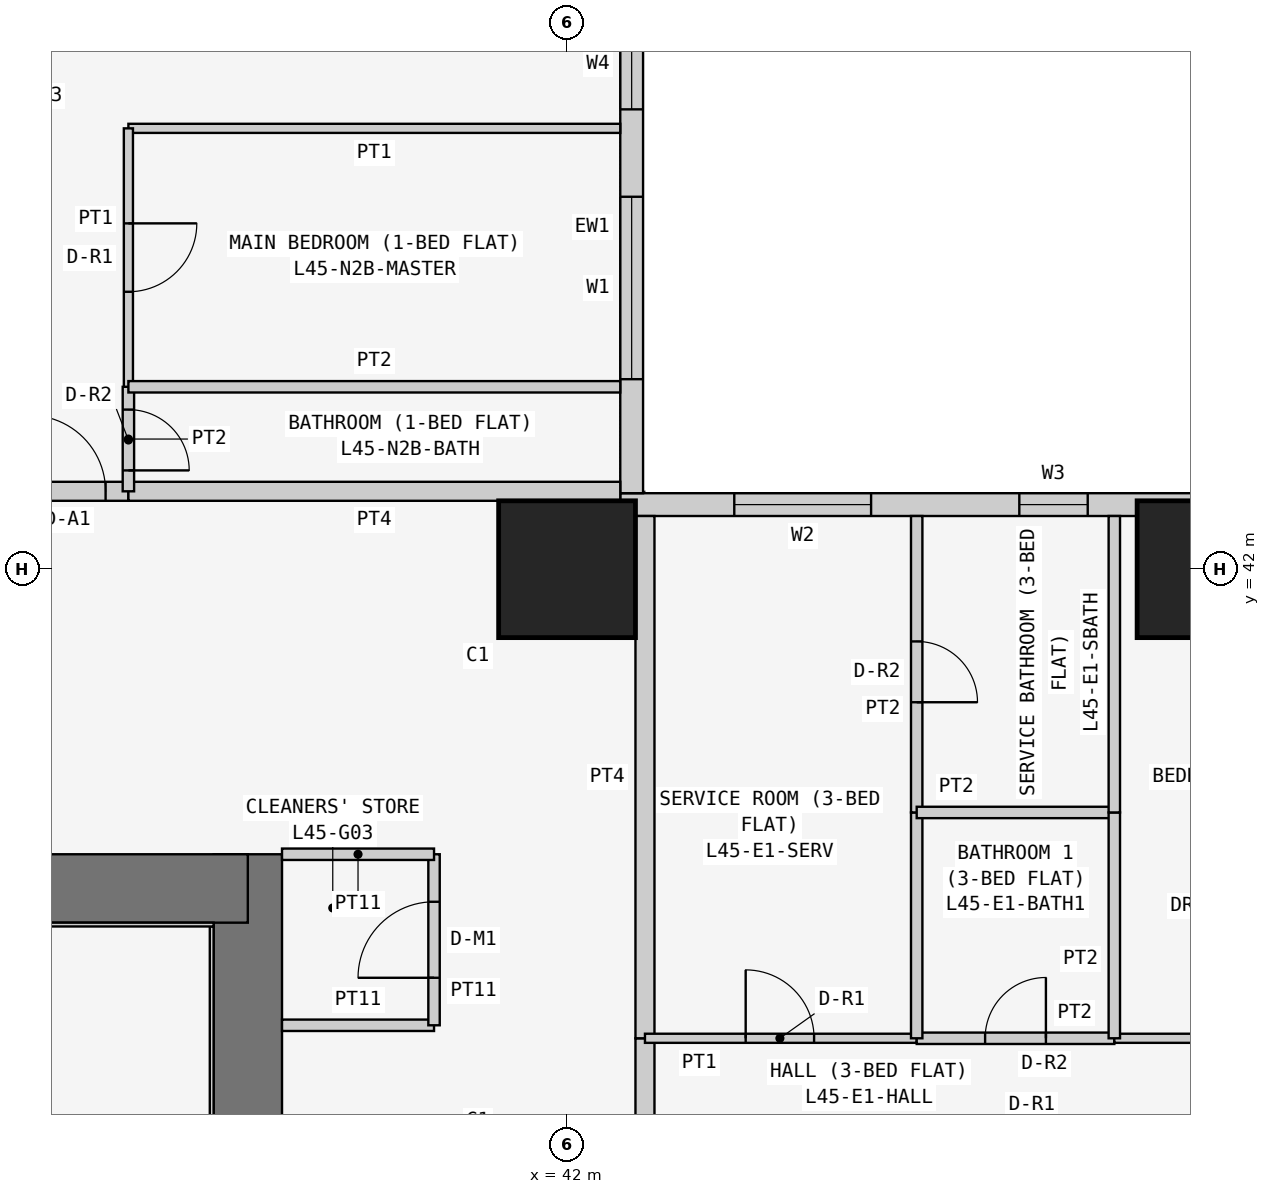
"""IFC4 building model, lengths in metres.
Left out: names, types, materials, properties, quantities, classifications, styles, units other than length and angle.
Written with IfcOpenShell. Run it as: python <this file> out.ifc"""

import sys

from ifc_helpers import new_model, si_unit, direction, frame, frame_2d, origin, origin_2d, place, context, subcontext, project, spatial, rectangle, extrude, element, fill, save


model = new_model("IFC4")
c1 = context("Model", 3, precision=1e-05, world=origin(), true_north=direction((0.0, 1.0)))
c2 = subcontext(c1, "Body", "Model", "MODEL_VIEW")
j1 = project(units=[si_unit("LENGTHUNIT", "METRE"), si_unit("PLANEANGLEUNIT", "RADIAN")], contexts=[c1])
p1 = place(None, origin())
s1 = spatial("IfcSite", under=j1, at=p1, CompositionType="ELEMENT")
p2 = place(p1, origin())
s2 = spatial("IfcBuilding", under=s1, at=p2, CompositionType="ELEMENT")
p3 = place(p2, frame((0.0, 0.0, 173.7)))
s3 = spatial("IfcBuildingStorey", under=s2, at=p3, CompositionType="ELEMENT", Elevation=173.7)
for number, where, z_axis, x_axis in (
    (1, (42.0, 42.0, 0.0), (0.0, 0.0, 1.0), (1.0, 0.0, 0.0)),
    (2, (50.4, 42.0, 0.0), (0.0, 0.0, 1.0), (1.0, 0.0, 0.0)),
):
    element("IfcColumn", number, at=place(p3, frame(where, z_axis=z_axis, x_axis=x_axis)), inside=s3, PredefinedType="COLUMN", context=c2, shape_type="SweptSolid", body=[
        extrude(rectangle(XDim=1.8, YDim=1.8, at=origin_2d()), origin(), (0.0, 0.0, 1.0), 3.6),
    ])
p4 = place(p3, frame((37.8, 21.0, 0.0), z_axis=(0.0, 0.0, 1.0), x_axis=(0.0, 1.0, 0.0)))
e3 = element("IfcWall", 3, at=p4, inside=s3, PredefinedType="SHEAR", context=c2, shape_type="SweptSolid", body=[
    extrude(rectangle(XDim=17.25, YDim=0.9, at=frame_2d((8.625, 0.0))), origin(), (0.0, 0.0, 1.0), 3.6),
])
p5 = place(p4, frame((5.2, 0.0, 0.0)))
e4 = element("IfcOpeningElement", 4, at=p5, cuts=e3, PredefinedType="OPENING", context=c2, shape_type="SweptSolid", body=[
    extrude(rectangle(XDim=1.2, YDim=2.1, at=frame_2d((0.6, 1.05))), frame((0.0, 0.46, 0.0), z_axis=(0.0, -1.0, 0.0), x_axis=(1.0, 0.0, 0.0)), (0.0, 0.0, 1.0), 0.92),
])
p6 = place(p3, frame((37.8, 37.8, 0.0), z_axis=(0.0, 0.0, 1.0), x_axis=(-1.0, 0.0, 0.0)))
e5 = element("IfcWall", 5, at=p6, inside=s3, PredefinedType="SHEAR", context=c2, shape_type="SweptSolid", body=[
    extrude(rectangle(XDim=17.25, YDim=0.9, at=frame_2d((8.625, 0.0))), origin(), (0.0, 0.0, 1.0), 3.6),
])
p7 = place(p3, frame((58.4, 42.85, 0.0), z_axis=(0.0, 0.0, 1.0), x_axis=(-1.0, 0.0, 0.0)))
e6 = element("IfcWall", 6, at=p7, inside=s3, PredefinedType="SOLIDWALL", context=c2, shape_type="SweptSolid", body=[
    extrude(rectangle(XDim=15.7, YDim=0.3, at=frame_2d((7.85, 0.0))), origin(), (0.0, 0.0, 1.0), 3.35),
])
p8 = place(p7, frame((12.4, 0.0, 0.9)))
e7 = element("IfcOpeningElement", 7, at=p8, cuts=e6, PredefinedType="OPENING", context=c2, shape_type="SweptSolid", body=[
    extrude(rectangle(XDim=1.8, YDim=1.5, at=frame_2d((0.9, 0.75))), frame((0.0, 0.16, 0.0), z_axis=(0.0, -1.0, 0.0), x_axis=(1.0, 0.0, 0.0)), (0.0, 0.0, 1.0), 0.32),
])
p9 = place(p7, frame((9.55, 0.0, 1.5)))
e8 = element("IfcOpeningElement", 8, at=p9, cuts=e6, PredefinedType="OPENING", context=c2, shape_type="SweptSolid", body=[
    extrude(rectangle(XDim=0.9, YDim=0.7, at=frame_2d((0.45, 0.35))), frame((0.0, 0.16, 0.0), z_axis=(0.0, -1.0, 0.0), x_axis=(1.0, 0.0, 0.0)), (0.0, 0.0, 1.0), 0.32),
])
p10 = place(p7, frame((5.1, 0.0, 0.9)))
e9 = element("IfcOpeningElement", 9, at=p10, cuts=e6, PredefinedType="OPENING", context=c2, shape_type="SweptSolid", body=[
    extrude(rectangle(XDim=1.8, YDim=1.5, at=frame_2d((0.9, 0.75))), frame((0.0, 0.16, 0.0), z_axis=(0.0, -1.0, 0.0), x_axis=(1.0, 0.0, 0.0)), (0.0, 0.0, 1.0), 0.32),
])
p11 = place(p7, frame((2.0, 0.0, 0.0)))
e10 = element("IfcOpeningElement", 10, at=p11, cuts=e6, PredefinedType="OPENING", context=c2, shape_type="SweptSolid", body=[
    extrude(rectangle(XDim=0.9, YDim=2.4, at=frame_2d((0.45, 1.2))), frame((0.0, 0.16, 0.0), z_axis=(0.0, -1.0, 0.0), x_axis=(1.0, 0.0, 0.0)), (0.0, 0.0, 1.0), 0.32),
])
p12 = place(p7, frame((0.7, 0.0, 0.9)))
e11 = element("IfcOpeningElement", 11, at=p12, cuts=e6, PredefinedType="OPENING", context=c2, shape_type="SweptSolid", body=[
    extrude(rectangle(XDim=1.2, YDim=1.5, at=frame_2d((0.6, 0.75))), frame((0.0, 0.16, 0.0), z_axis=(0.0, -1.0, 0.0), x_axis=(1.0, 0.0, 0.0)), (0.0, 0.0, 1.0), 0.32),
])
p13 = place(p3, frame((42.85, 43.0, 0.0), z_axis=(0.0, 0.0, 1.0), x_axis=(0.0, 1.0, 0.0)))
e12 = element("IfcWall", 12, at=p13, inside=s3, PredefinedType="SOLIDWALL", context=c2, shape_type="SweptSolid", body=[
    extrude(rectangle(XDim=7.0, YDim=0.3, at=frame_2d((3.5, 0.0))), origin(), (0.0, 0.0, 1.0), 3.35),
])
p14 = place(p13, frame((1.5, 0.0, 0.9)))
e13 = element("IfcOpeningElement", 13, at=p14, cuts=e12, PredefinedType="OPENING", context=c2, shape_type="SweptSolid", body=[
    extrude(rectangle(XDim=2.4, YDim=1.5, at=frame_2d((1.2, 0.75))), frame((0.0, 0.16, 0.0), z_axis=(0.0, -1.0, 0.0), x_axis=(1.0, 0.0, 0.0)), (0.0, 0.0, 1.0), 0.32),
])
p15 = place(p13, frame((5.05, 0.0, 0.9)))
e14 = element("IfcOpeningElement", 14, at=p15, cuts=e12, PredefinedType="OPENING", context=c2, shape_type="SweptSolid", body=[
    extrude(rectangle(XDim=1.2, YDim=1.5, at=frame_2d((0.6, 0.75))), frame((0.0, 0.16, 0.0), z_axis=(0.0, -1.0, 0.0), x_axis=(1.0, 0.0, 0.0)), (0.0, 0.0, 1.0), 0.32),
])
p16 = place(p3, frame((38.25, 36.0, 0.0), z_axis=(0.0, 0.0, 1.0), x_axis=(1.0, 0.0, 0.0)))
e15 = element("IfcWall", 15, at=p16, inside=s3, PredefinedType="PARTITIONING", context=c2, shape_type="SweptSolid", body=[
    extrude(rectangle(XDim=2.0, YDim=0.15, at=frame_2d((1.0, 0.0))), origin(), (0.0, 0.0, 1.0), 3.35),
])
p17 = place(p3, frame((40.25, 36.0, 0.0), z_axis=(0.0, 0.0, 1.0), x_axis=(0.0, 1.0, 0.0)))
e16 = element("IfcWall", 16, at=p17, inside=s3, PredefinedType="PARTITIONING", context=c2, shape_type="SweptSolid", body=[
    extrude(rectangle(XDim=2.25, YDim=0.15, at=frame_2d((1.125, 0.0))), origin(), (0.0, 0.0, 1.0), 3.35),
])
p18 = place(p17, frame((0.625, 0.0, 0.0)))
e17 = element("IfcOpeningElement", 17, at=p18, cuts=e16, PredefinedType="OPENING", context=c2, shape_type="SweptSolid", body=[
    extrude(rectangle(XDim=1.0, YDim=2.1, at=frame_2d((0.5, 1.05))), frame((0.0, 0.085, 0.0), z_axis=(0.0, -1.0, 0.0), x_axis=(1.0, 0.0, 0.0)), (0.0, 0.0, 1.0), 0.17),
])
p19 = place(p3, frame((40.25, 38.25, 0.0), z_axis=(0.0, 0.0, 1.0), x_axis=(-1.0, 0.0, 0.0)))
e18 = element("IfcWall", 18, at=p19, inside=s3, PredefinedType="PARTITIONING", context=c2, shape_type="SweptSolid", body=[
    extrude(rectangle(XDim=2.0, YDim=0.15, at=frame_2d((1.0, 0.0))), origin(), (0.0, 0.0, 1.0), 3.35),
])
p20 = place(p3, frame((34.629, 43.025, 0.0), z_axis=(0.0, 0.0, 1.0), x_axis=(1.0, 0.0, 0.0)))
e19 = element("IfcWall", 19, at=p20, inside=s3, PredefinedType="PARTITIONING", context=c2, shape_type="SweptSolid", body=[
    extrude(rectangle(XDim=1.6, YDim=0.25, at=frame_2d((0.8, 0.0))), origin(), (0.0, 0.0, 1.0), 3.35),
])
p21 = place(p20, frame((0.3, 0.0, 0.0)))
e20 = element("IfcOpeningElement", 20, at=p21, cuts=e19, PredefinedType="OPENING", context=c2, shape_type="SweptSolid", body=[
    extrude(rectangle(XDim=1.0, YDim=2.1, at=frame_2d((0.5, 1.05))), frame((0.0, 0.135, 0.0), z_axis=(0.0, -1.0, 0.0), x_axis=(1.0, 0.0, 0.0)), (0.0, 0.0, 1.0), 0.27),
])
p22 = place(p3, frame((36.229, 43.025, 0.0), z_axis=(0.0, 0.0, 1.0), x_axis=(1.0, 0.0, 0.0)))
e21 = element("IfcWall", 21, at=p22, inside=s3, PredefinedType="PARTITIONING", context=c2, shape_type="SweptSolid", body=[
    extrude(rectangle(XDim=6.471, YDim=0.25, at=frame_2d((3.235, 0.0))), origin(), (0.0, 0.0, 1.0), 3.35),
])
p23 = place(p3, frame((43.025, 35.829, 0.0), z_axis=(0.0, 0.0, 1.0), x_axis=(0.0, -1.0, 0.0)))
e22 = element("IfcWall", 22, at=p23, inside=s3, PredefinedType="PARTITIONING", context=c2, shape_type="SweptSolid", body=[
    extrude(rectangle(XDim=1.2, YDim=0.25, at=frame_2d((0.6, 0.0))), origin(), (0.0, 0.0, 1.0), 3.35),
])
p24 = place(p3, frame((43.025, 42.7, 0.0), z_axis=(0.0, 0.0, 1.0), x_axis=(0.0, -1.0, 0.0)))
e23 = element("IfcWall", 23, at=p24, inside=s3, PredefinedType="PARTITIONING", context=c2, shape_type="SweptSolid", body=[
    extrude(rectangle(XDim=6.871, YDim=0.25, at=frame_2d((3.436, 0.0))), origin(), (0.0, 0.0, 1.0), 3.35),
])
p25 = place(p3, frame((36.229, 44.4, 0.0), z_axis=(0.0, 0.0, 1.0), x_axis=(0.0, -1.0, 0.0)))
e24 = element("IfcWall", 24, at=p25, inside=s3, PredefinedType="PARTITIONING", context=c2, shape_type="SweptSolid", body=[
    extrude(rectangle(XDim=1.375, YDim=0.15, at=frame_2d((0.688, 0.0))), origin(), (0.0, 0.0, 1.0), 3.35),
])
p26 = place(p25, frame((0.3, 0.0, 0.0)))
e25 = element("IfcOpeningElement", 25, at=p26, cuts=e24, PredefinedType="OPENING", context=c2, shape_type="SweptSolid", body=[
    extrude(rectangle(XDim=0.8, YDim=2.1, at=frame_2d((0.4, 1.05))), frame((0.0, 0.085, 0.0), z_axis=(0.0, -1.0, 0.0), x_axis=(1.0, 0.0, 0.0)), (0.0, 0.0, 1.0), 0.17),
])
p27 = place(p3, frame((42.7, 47.8, 0.0), z_axis=(0.0, 0.0, 1.0), x_axis=(-1.0, 0.0, 0.0)))
e26 = element("IfcWall", 26, at=p27, inside=s3, PredefinedType="PARTITIONING", context=c2, shape_type="SweptSolid", body=[
    extrude(rectangle(XDim=6.471, YDim=0.12, at=frame_2d((3.235, 0.0))), origin(), (0.0, 0.0, 1.0), 3.35),
])
p28 = place(p3, frame((36.229, 47.8, 0.0), z_axis=(0.0, 0.0, 1.0), x_axis=(0.0, -1.0, 0.0)))
e27 = element("IfcWall", 27, at=p28, inside=s3, PredefinedType="PARTITIONING", context=c2, shape_type="SweptSolid", body=[
    extrude(rectangle(XDim=3.4, YDim=0.12, at=frame_2d((1.7, 0.0))), origin(), (0.0, 0.0, 1.0), 3.35),
])
p29 = place(p28, frame((1.25, 0.0, 0.0)))
e28 = element("IfcOpeningElement", 28, at=p29, cuts=e27, PredefinedType="OPENING", context=c2, shape_type="SweptSolid", body=[
    extrude(rectangle(XDim=0.9, YDim=2.1, at=frame_2d((0.45, 1.05))), frame((0.0, 0.07, 0.0), z_axis=(0.0, -1.0, 0.0), x_axis=(1.0, 0.0, 0.0)), (0.0, 0.0, 1.0), 0.14),
])
p30 = place(p3, frame((36.229, 44.4, 0.0), z_axis=(0.0, 0.0, 1.0), x_axis=(1.0, 0.0, 0.0)))
e29 = element("IfcWall", 29, at=p30, inside=s3, PredefinedType="PARTITIONING", context=c2, shape_type="SweptSolid", body=[
    extrude(rectangle(XDim=6.471, YDim=0.15, at=frame_2d((3.235, 0.0))), origin(), (0.0, 0.0, 1.0), 3.35),
])
p31 = place(p3, frame((46.6, 35.829, 0.0), z_axis=(0.0, 0.0, 1.0), x_axis=(-1.0, 0.0, 0.0)))
e30 = element("IfcWall", 30, at=p31, inside=s3, PredefinedType="PARTITIONING", context=c2, shape_type="SweptSolid", body=[
    extrude(rectangle(XDim=3.575, YDim=0.12, at=frame_2d((1.788, 0.0))), origin(), (0.0, 0.0, 1.0), 3.35),
])
p32 = place(p31, frame((1.35, 0.0, 0.0)))
e31 = element("IfcOpeningElement", 31, at=p32, cuts=e30, PredefinedType="OPENING", context=c2, shape_type="SweptSolid", body=[
    extrude(rectangle(XDim=0.9, YDim=2.1, at=frame_2d((0.45, 1.05))), frame((0.0, 0.07, 0.0), z_axis=(0.0, -1.0, 0.0), x_axis=(1.0, 0.0, 0.0)), (0.0, 0.0, 1.0), 0.14),
])
p33 = place(p3, frame((49.2, 35.829, 0.0), z_axis=(0.0, 0.0, 1.0), x_axis=(-1.0, 0.0, 0.0)))
e32 = element("IfcWall", 32, at=p33, inside=s3, PredefinedType="PARTITIONING", context=c2, shape_type="SweptSolid", body=[
    extrude(rectangle(XDim=2.6, YDim=0.15, at=frame_2d((1.3, 0.0))), origin(), (0.0, 0.0, 1.0), 3.35),
])
p34 = place(p33, frame((0.9, 0.0, 0.0)))
e33 = element("IfcOpeningElement", 33, at=p34, cuts=e32, PredefinedType="OPENING", context=c2, shape_type="SweptSolid", body=[
    extrude(rectangle(XDim=0.8, YDim=2.1, at=frame_2d((0.4, 1.05))), frame((0.0, 0.085, 0.0), z_axis=(0.0, -1.0, 0.0), x_axis=(1.0, 0.0, 0.0)), (0.0, 0.0, 1.0), 0.17),
])
p35 = place(p3, frame((54.1, 35.829, 0.0), z_axis=(0.0, 0.0, 1.0), x_axis=(-1.0, 0.0, 0.0)))
e34 = element("IfcWall", 34, at=p35, inside=s3, PredefinedType="PARTITIONING", context=c2, shape_type="SweptSolid", body=[
    extrude(rectangle(XDim=4.9, YDim=0.12, at=frame_2d((2.45, 0.0))), origin(), (0.0, 0.0, 1.0), 3.35),
])
p36 = place(p35, frame((1.65, 0.0, 0.0)))
e35 = element("IfcOpeningElement", 35, at=p36, cuts=e34, PredefinedType="OPENING", context=c2, shape_type="SweptSolid", body=[
    extrude(rectangle(XDim=0.9, YDim=2.1, at=frame_2d((0.45, 1.05))), frame((0.0, 0.07, 0.0), z_axis=(0.0, -1.0, 0.0), x_axis=(1.0, 0.0, 0.0)), (0.0, 0.0, 1.0), 0.14),
])
p37 = place(p3, frame((46.6, 35.829, 0.0), z_axis=(0.0, 0.0, 1.0), x_axis=(0.0, 1.0, 0.0)))
e36 = element("IfcWall", 36, at=p37, inside=s3, PredefinedType="PARTITIONING", context=c2, shape_type="SweptSolid", body=[
    extrude(rectangle(XDim=2.971, YDim=0.15, at=frame_2d((1.485, 0.0))), origin(), (0.0, 0.0, 1.0), 3.35),
])
p38 = place(p3, frame((46.6, 38.8, 0.0), z_axis=(0.0, 0.0, 1.0), x_axis=(0.0, 1.0, 0.0)))
e37 = element("IfcWall", 37, at=p38, inside=s3, PredefinedType="PARTITIONING", context=c2, shape_type="SweptSolid", body=[
    extrude(rectangle(XDim=3.9, YDim=0.15, at=frame_2d((1.95, 0.0))), origin(), (0.0, 0.0, 1.0), 3.35),
])
p39 = place(p38, frame((1.45, 0.0, 0.0)))
e38 = element("IfcOpeningElement", 38, at=p39, cuts=e37, PredefinedType="OPENING", context=c2, shape_type="SweptSolid", body=[
    extrude(rectangle(XDim=0.8, YDim=2.1, at=frame_2d((0.4, 1.05))), frame((0.0, 0.085, 0.0), z_axis=(0.0, -1.0, 0.0), x_axis=(1.0, 0.0, 0.0)), (0.0, 0.0, 1.0), 0.17),
])
p40 = place(p3, frame((49.2, 38.8, 0.0), z_axis=(0.0, 0.0, 1.0), x_axis=(-1.0, 0.0, 0.0)))
e39 = element("IfcWall", 39, at=p40, inside=s3, PredefinedType="PARTITIONING", context=c2, shape_type="SweptSolid", body=[
    extrude(rectangle(XDim=2.6, YDim=0.15, at=frame_2d((1.3, 0.0))), origin(), (0.0, 0.0, 1.0), 3.35),
])
p41 = place(p3, frame((49.2, 35.829, 0.0), z_axis=(0.0, 0.0, 1.0), x_axis=(0.0, 1.0, 0.0)))
e40 = element("IfcWall", 40, at=p41, inside=s3, PredefinedType="PARTITIONING", context=c2, shape_type="SweptSolid", body=[
    extrude(rectangle(XDim=2.971, YDim=0.15, at=frame_2d((1.485, 0.0))), origin(), (0.0, 0.0, 1.0), 3.35),
])
p42 = place(p3, frame((49.2, 38.8, 0.0), z_axis=(0.0, 0.0, 1.0), x_axis=(0.0, 1.0, 0.0)))
e41 = element("IfcWall", 41, at=p42, inside=s3, PredefinedType="PARTITIONING", context=c2, shape_type="SweptSolid", body=[
    extrude(rectangle(XDim=3.9, YDim=0.15, at=frame_2d((1.95, 0.0))), origin(), (0.0, 0.0, 1.0), 3.35),
])
p43 = place(p3, frame((32.4, 37.325, 1.8), z_axis=(0.0, 0.0, 1.0), x_axis=(1.0, 0.0, 0.0)))
e42 = element("IfcWall", 42, at=p43, inside=s3, PredefinedType="PARTITIONING", context=c2, shape_type="SweptSolid", body=[
    extrude(rectangle(XDim=4.95, YDim=0.05, at=frame_2d((2.475, 0.0))), origin(), (0.0, 0.0, 1.0), 1.8),
])
p44 = place(p3, frame((37.325, 33.52, 1.8), z_axis=(0.0, 0.0, 1.0), x_axis=(0.0, 1.0, 0.0)))
e43 = element("IfcWall", 43, at=p44, inside=s3, PredefinedType="PARTITIONING", context=c2, shape_type="SweptSolid", body=[
    extrude(rectangle(XDim=3.78, YDim=0.05, at=frame_2d((1.89, 0.0))), origin(), (0.0, 0.0, 1.0), 1.8),
])
p45 = place(p14, origin())
e44 = element("IfcWindow", 44, at=p45, inside=s3, PartitioningType="SINGLE_PANEL", PredefinedType="WINDOW", context=c2, shape_type="SweptSolid", body=[
    extrude(rectangle(XDim=2.4, YDim=1.5, at=frame_2d((1.2, 0.75))), frame((0.0, 0.03, 0.0), z_axis=(0.0, -1.0, 0.0), x_axis=(1.0, 0.0, 0.0)), (0.0, 0.0, 1.0), 0.06),
])
fill(e13, e44)
p46 = place(p15, origin())
e45 = element("IfcWindow", 45, at=p46, inside=s3, PartitioningType="SINGLE_PANEL", PredefinedType="WINDOW", context=c2, shape_type="SweptSolid", body=[
    extrude(rectangle(XDim=1.2, YDim=1.5, at=frame_2d((0.6, 0.75))), frame((0.0, 0.03, 0.0), z_axis=(0.0, -1.0, 0.0), x_axis=(1.0, 0.0, 0.0)), (0.0, 0.0, 1.0), 0.06),
])
fill(e14, e45)
p47 = place(p8, origin())
e46 = element("IfcWindow", 46, at=p47, inside=s3, PartitioningType="SINGLE_PANEL", PredefinedType="WINDOW", context=c2, shape_type="SweptSolid", body=[
    extrude(rectangle(XDim=1.8, YDim=1.5, at=frame_2d((0.9, 0.75))), frame((0.0, 0.03, 0.0), z_axis=(0.0, -1.0, 0.0), x_axis=(1.0, 0.0, 0.0)), (0.0, 0.0, 1.0), 0.06),
])
fill(e7, e46)
p48 = place(p9, origin())
e47 = element("IfcWindow", 47, at=p48, inside=s3, PartitioningType="SINGLE_PANEL", PredefinedType="WINDOW", context=c2, shape_type="SweptSolid", body=[
    extrude(rectangle(XDim=0.9, YDim=0.7, at=frame_2d((0.45, 0.35))), frame((0.0, 0.03, 0.0), z_axis=(0.0, -1.0, 0.0), x_axis=(1.0, 0.0, 0.0)), (0.0, 0.0, 1.0), 0.06),
])
fill(e8, e47)
p49 = place(p18, origin())
e48 = element("IfcDoor", 48, at=p49, inside=s3, OperationType="SINGLE_SWING_LEFT", PredefinedType="DOOR", context=c2, shape_type="SweptSolid", body=[
    extrude(rectangle(XDim=1.0, YDim=2.1, at=frame_2d((0.5, 1.05))), frame((0.0, 0.025, 0.0), z_axis=(0.0, -1.0, 0.0), x_axis=(1.0, 0.0, 0.0)), (0.0, 0.0, 1.0), 0.05),
])
fill(e17, e48)
p50 = place(p21, origin())
e49 = element("IfcDoor", 49, at=p50, inside=s3, OperationType="SINGLE_SWING_LEFT", PredefinedType="DOOR", context=c2, shape_type="SweptSolid", body=[
    extrude(rectangle(XDim=1.0, YDim=2.1, at=frame_2d((0.5, 1.05))), frame((0.0, 0.025, 0.0), z_axis=(0.0, -1.0, 0.0), x_axis=(1.0, 0.0, 0.0)), (0.0, 0.0, 1.0), 0.05),
])
fill(e20, e49)
p51 = place(p26, origin())
e50 = element("IfcDoor", 50, at=p51, inside=s3, OperationType="SINGLE_SWING_RIGHT", PredefinedType="DOOR", context=c2, shape_type="SweptSolid", body=[
    extrude(rectangle(XDim=0.8, YDim=2.1, at=frame_2d((0.4, 1.05))), frame((0.0, 0.025, 0.0), z_axis=(0.0, -1.0, 0.0), x_axis=(1.0, 0.0, 0.0)), (0.0, 0.0, 1.0), 0.05),
])
fill(e25, e50)
p52 = place(p29, origin())
e51 = element("IfcDoor", 51, at=p52, inside=s3, OperationType="SINGLE_SWING_LEFT", PredefinedType="DOOR", context=c2, shape_type="SweptSolid", body=[
    extrude(rectangle(XDim=0.9, YDim=2.1, at=frame_2d((0.45, 1.05))), frame((0.0, 0.025, 0.0), z_axis=(0.0, -1.0, 0.0), x_axis=(1.0, 0.0, 0.0)), (0.0, 0.0, 1.0), 0.05),
])
fill(e28, e51)
p53 = place(p32, frame((0.9, 0.0, 0.0), z_axis=(0.0, 0.0, 1.0), x_axis=(-1.0, 0.0, 0.0)))
e52 = element("IfcDoor", 52, at=p53, inside=s3, OperationType="SINGLE_SWING_LEFT", PredefinedType="DOOR", context=c2, shape_type="SweptSolid", body=[
    extrude(rectangle(XDim=0.9, YDim=2.1, at=frame_2d((0.45, 1.05))), frame((0.0, 0.025, 0.0), z_axis=(0.0, -1.0, 0.0), x_axis=(1.0, 0.0, 0.0)), (0.0, 0.0, 1.0), 0.05),
])
fill(e31, e52)
p54 = place(p39, frame((0.8, 0.0, 0.0), z_axis=(0.0, 0.0, 1.0), x_axis=(-1.0, 0.0, 0.0)))
e53 = element("IfcDoor", 53, at=p54, inside=s3, OperationType="SINGLE_SWING_RIGHT", PredefinedType="DOOR", context=c2, shape_type="SweptSolid", body=[
    extrude(rectangle(XDim=0.8, YDim=2.1, at=frame_2d((0.4, 1.05))), frame((0.0, 0.025, 0.0), z_axis=(0.0, -1.0, 0.0), x_axis=(1.0, 0.0, 0.0)), (0.0, 0.0, 1.0), 0.05),
])
fill(e38, e53)
p55 = place(p34, frame((0.8, 0.0, 0.0), z_axis=(0.0, 0.0, 1.0), x_axis=(-1.0, 0.0, 0.0)))
e54 = element("IfcDoor", 54, at=p55, inside=s3, OperationType="SINGLE_SWING_RIGHT", PredefinedType="DOOR", context=c2, shape_type="SweptSolid", body=[
    extrude(rectangle(XDim=0.8, YDim=2.1, at=frame_2d((0.4, 1.05))), frame((0.0, 0.025, 0.0), z_axis=(0.0, -1.0, 0.0), x_axis=(1.0, 0.0, 0.0)), (0.0, 0.0, 1.0), 0.05),
])
fill(e33, e54)
save(model, sys.argv[1])
